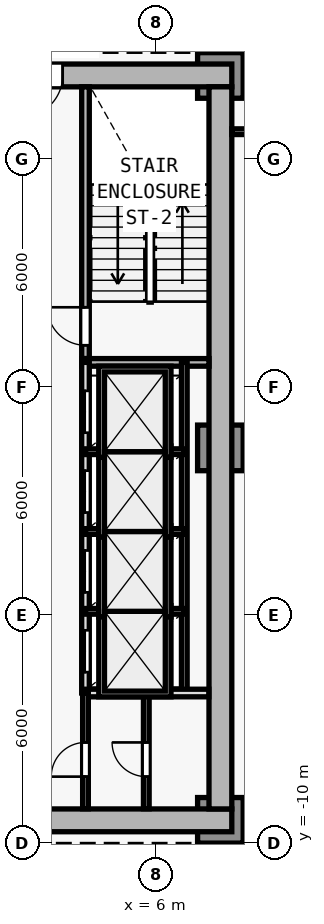
"""IFC4 building model, lengths in metres.
Left out: names, types, materials, properties, quantities, classifications, styles, units other than length and angle.
Written with IfcOpenShell. Run it as: python <this file> out.ifc"""

import sys

from ifc_helpers import new_model, si_unit, direction, frame, frame_2d, origin, origin_2d, place, context, subcontext, project, spatial, rectangle, extrude, element, fill, save


model = new_model("IFC4")
c1 = context("Model", 3, precision=1e-05, world=origin(), true_north=direction((0.0, 1.0)))
c2 = subcontext(c1, "Body", "Model", "MODEL_VIEW")
j1 = project(units=[si_unit("LENGTHUNIT", "METRE"), si_unit("PLANEANGLEUNIT", "RADIAN")], contexts=[c1])
p1 = place(None, origin())
s1 = spatial("IfcSite", under=j1, at=p1, CompositionType="ELEMENT")
p2 = place(p1, origin())
s2 = spatial("IfcBuilding", under=s1, at=p2, CompositionType="ELEMENT")
p3 = place(p2, frame((0.0, 0.0, 5.0)))
s3 = spatial("IfcBuildingStorey", under=s2, at=p3, CompositionType="ELEMENT", Elevation=5.0)
for number, where, z_axis, x_axis in (
    (1, (7.7, -9.4, 0.0), (0.0, 0.0, 1.0), (1.0, 0.0, 0.0)),
    (2, (7.7, 10.2, 0.0), (0.0, 0.0, 1.0), (1.0, 0.0, 0.0)),
    (3, (7.7, 0.4, 0.0), (0.0, 0.0, 1.0), (1.0, 0.0, 0.0)),
):
    element("IfcColumn", number, at=place(p3, frame(where, z_axis=z_axis, x_axis=x_axis)), inside=s3, PredefinedType="COLUMN", context=c2, shape_type="SweptSolid", body=[
        extrude(rectangle(XDim=1.2, YDim=1.2, at=origin_2d()), origin(), (0.0, 0.0, 1.0), 4.2),
    ])
p4 = place(p3, frame((-8.0, -9.4, 0.0), z_axis=(0.0, 0.0, 1.0), x_axis=(1.0, 0.0, 0.0)))
e4 = element("IfcWall", 4, at=p4, inside=s3, PredefinedType="SHEAR", context=c2, shape_type="SweptSolid", body=[
    extrude(rectangle(XDim=16.0, YDim=0.6, at=frame_2d((8.0, 0.0))), origin(), (0.0, 0.0, 1.0), 3.92),
])
p5 = place(p4, frame((9.65, 0.0, 0.0)))
e5 = element("IfcOpeningElement", 5, at=p5, cuts=e4, PredefinedType="OPENING", context=c2, shape_type="SweptSolid", body=[
    extrude(rectangle(XDim=1.5, YDim=2.2, at=frame_2d((0.75, 1.1))), frame((0.0, 0.31, 0.0), z_axis=(0.0, -1.0, 0.0), x_axis=(1.0, 0.0, 0.0)), (0.0, 0.0, 1.0), 0.62),
])
p6 = place(p3, frame((8.0, 10.2, 0.0), z_axis=(0.0, 0.0, 1.0), x_axis=(-1.0, 0.0, 0.0)))
e6 = element("IfcWall", 6, at=p6, inside=s3, PredefinedType="SHEAR", context=c2, shape_type="SweptSolid", body=[
    extrude(rectangle(XDim=16.0, YDim=0.6, at=frame_2d((8.0, 0.0))), origin(), (0.0, 0.0, 1.0), 3.92),
])
p7 = place(p6, frame((4.45, 0.0, 0.0)))
e7 = element("IfcOpeningElement", 7, at=p7, cuts=e6, PredefinedType="OPENING", context=c2, shape_type="SweptSolid", body=[
    extrude(rectangle(XDim=1.1, YDim=2.15, at=frame_2d((0.55, 1.075))), frame((0.0, 0.31, 0.0), z_axis=(0.0, -1.0, 0.0), x_axis=(1.0, 0.0, 0.0)), (0.0, 0.0, 1.0), 0.62),
])
p8 = place(p3, frame((7.7, 9.9, 0.0), z_axis=(0.0, 0.0, 1.0), x_axis=(0.0, -1.0, 0.0)))
e8 = element("IfcWall", 8, at=p8, inside=s3, PredefinedType="SHEAR", context=c2, shape_type="SweptSolid", body=[
    extrude(rectangle(XDim=19.0, YDim=0.6, at=frame_2d((9.5, 0.0))), origin(), (0.0, 0.0, 1.0), 3.92),
])
p9 = place(p3, frame((4.15, 2.75, 0.0), z_axis=(0.0, 0.0, 1.0), x_axis=(0.0, 1.0, 0.0)))
e9 = element("IfcWall", 9, at=p9, inside=s3, PredefinedType="SOLIDWALL", context=c2, shape_type="SweptSolid", body=[
    extrude(rectangle(XDim=7.15, YDim=0.2, at=frame_2d((3.575, 0.0))), origin(), (0.0, 0.0, 1.0), 3.92),
])
p10 = place(p9, frame((0.35, 0.0, 0.0)))
e10 = element("IfcOpeningElement", 10, at=p10, cuts=e9, PredefinedType="OPENING", context=c2, shape_type="SweptSolid", body=[
    extrude(rectangle(XDim=1.0, YDim=2.15, at=frame_2d((0.5, 1.075))), frame((0.0, 0.11, 0.0), z_axis=(0.0, -1.0, 0.0), x_axis=(1.0, 0.0, 0.0)), (0.0, 0.0, 1.0), 0.22),
])
p11 = place(p3, frame((4.05, 2.65, 0.0), z_axis=(0.0, 0.0, 1.0), x_axis=(1.0, 0.0, 0.0)))
e11 = element("IfcWall", 11, at=p11, inside=s3, PredefinedType="SOLIDWALL", context=c2, shape_type="SweptSolid", body=[
    extrude(rectangle(XDim=3.35, YDim=0.2, at=frame_2d((1.675, 0.0))), origin(), (0.0, 0.0, 1.0), 3.92),
])
p12 = place(p3, frame((4.15, -6.05, 0.0), z_axis=(0.0, 0.0, 1.0), x_axis=(0.0, 1.0, 0.0)))
e12 = element("IfcWall", 12, at=p12, inside=s3, PredefinedType="SOLIDWALL", context=c2, shape_type="SweptSolid", body=[
    extrude(rectangle(XDim=8.7, YDim=0.2, at=frame_2d((4.35, 0.0))), origin(), (0.0, 0.0, 1.0), 3.92),
])
p13 = place(p12, frame((0.55, 0.0, 0.0)))
e13 = element("IfcOpeningElement", 13, at=p13, cuts=e12, PredefinedType="OPENING", context=c2, shape_type="SweptSolid", body=[
    extrude(rectangle(XDim=1.1, YDim=2.15, at=frame_2d((0.55, 1.075))), frame((0.0, 0.11, 0.0), z_axis=(0.0, -1.0, 0.0), x_axis=(1.0, 0.0, 0.0)), (0.0, 0.0, 1.0), 0.22),
])
p14 = place(p12, frame((2.65, 0.0, 0.0)))
e14 = element("IfcOpeningElement", 14, at=p14, cuts=e12, PredefinedType="OPENING", context=c2, shape_type="SweptSolid", body=[
    extrude(rectangle(XDim=1.1, YDim=2.15, at=frame_2d((0.55, 1.075))), frame((0.0, 0.11, 0.0), z_axis=(0.0, -1.0, 0.0), x_axis=(1.0, 0.0, 0.0)), (0.0, 0.0, 1.0), 0.22),
])
p15 = place(p12, frame((4.75, 0.0, 0.0)))
e15 = element("IfcOpeningElement", 15, at=p15, cuts=e12, PredefinedType="OPENING", context=c2, shape_type="SweptSolid", body=[
    extrude(rectangle(XDim=1.1, YDim=2.15, at=frame_2d((0.55, 1.075))), frame((0.0, 0.11, 0.0), z_axis=(0.0, -1.0, 0.0), x_axis=(1.0, 0.0, 0.0)), (0.0, 0.0, 1.0), 0.22),
])
p16 = place(p12, frame((6.85, 0.0, 0.0)))
e16 = element("IfcOpeningElement", 16, at=p16, cuts=e12, PredefinedType="OPENING", context=c2, shape_type="SweptSolid", body=[
    extrude(rectangle(XDim=1.1, YDim=2.15, at=frame_2d((0.55, 1.075))), frame((0.0, 0.11, 0.0), z_axis=(0.0, -1.0, 0.0), x_axis=(1.0, 0.0, 0.0)), (0.0, 0.0, 1.0), 0.22),
])
p17 = place(p3, frame((6.75, -6.05, 0.0), z_axis=(0.0, 0.0, 1.0), x_axis=(0.0, 1.0, 0.0)))
e17 = element("IfcWall", 17, at=p17, inside=s3, PredefinedType="PARTITIONING", context=c2, shape_type="SweptSolid", body=[
    extrude(rectangle(XDim=8.7, YDim=0.15, at=frame_2d((4.35, 0.0))), origin(), (0.0, 0.0, 1.0), 3.92),
])
for number, where, z_axis, x_axis in (
    (18, (4.15, -3.9, 0.0), (0.0, 0.0, 1.0), (1.0, 0.0, 0.0)),
    (19, (4.15, -1.8, 0.0), (0.0, 0.0, 1.0), (1.0, 0.0, 0.0)),
    (20, (4.15, 0.3, 0.0), (0.0, 0.0, 1.0), (1.0, 0.0, 0.0)),
):
    element("IfcWall", number, at=place(p3, frame(where, z_axis=z_axis, x_axis=x_axis)), inside=s3, PredefinedType="PARTITIONING", context=c2, shape_type="SweptSolid", body=[
        extrude(rectangle(XDim=2.6, YDim=0.15, at=frame_2d((1.3, 0.0))), origin(), (0.0, 0.0, 1.0), 3.92),
    ])
p18 = place(p3, frame((4.15, -6.05, 0.0), z_axis=(0.0, 0.0, 1.0), x_axis=(1.0, 0.0, 0.0)))
e21 = element("IfcWall", 21, at=p18, inside=s3, PredefinedType="SOLIDWALL", context=c2, shape_type="SweptSolid", body=[
    extrude(rectangle(XDim=3.245, YDim=0.2, at=frame_2d((1.623, 0.0))), origin(), (0.0, 0.0, 1.0), 3.92),
])
p19 = place(p3, frame((4.15, -9.095, 0.0), z_axis=(0.0, 0.0, 1.0), x_axis=(0.0, 1.0, 0.0)))
e22 = element("IfcWall", 22, at=p19, inside=s3, PredefinedType="PARTITIONING", context=c2, shape_type="SweptSolid", body=[
    extrude(rectangle(XDim=3.045, YDim=0.15, at=frame_2d((1.522, 0.0))), origin(), (0.0, 0.0, 1.0), 3.92),
])
p20 = place(p19, frame((0.845, 0.0, 0.0)))
e23 = element("IfcOpeningElement", 23, at=p20, cuts=e22, PredefinedType="OPENING", context=c2, shape_type="SweptSolid", body=[
    extrude(rectangle(XDim=0.9, YDim=2.1, at=frame_2d((0.45, 1.05))), frame((0.0, 0.085, 0.0), z_axis=(0.0, -1.0, 0.0), x_axis=(1.0, 0.0, 0.0)), (0.0, 0.0, 1.0), 0.17),
])
p21 = place(p3, frame((5.75, -9.095, 0.0), z_axis=(0.0, 0.0, 1.0), x_axis=(0.0, 1.0, 0.0)))
e24 = element("IfcWall", 24, at=p21, inside=s3, PredefinedType="PARTITIONING", context=c2, shape_type="SweptSolid", body=[
    extrude(rectangle(XDim=3.045, YDim=0.15, at=frame_2d((1.522, 0.0))), origin(), (0.0, 0.0, 1.0), 3.92),
])
p22 = place(p21, frame((0.845, 0.0, 0.0)))
e25 = element("IfcOpeningElement", 25, at=p22, cuts=e24, PredefinedType="OPENING", context=c2, shape_type="SweptSolid", body=[
    extrude(rectangle(XDim=0.9, YDim=2.1, at=frame_2d((0.45, 1.05))), frame((0.0, 0.085, 0.0), z_axis=(0.0, -1.0, 0.0), x_axis=(1.0, 0.0, 0.0)), (0.0, 0.0, 1.0), 0.17),
])
p23 = place(p3, frame((8.0, 8.72, 0.0), z_axis=(0.0, 0.0, 1.0), x_axis=(1.0, 0.0, 0.0)))
e26 = element("IfcWall", 26, at=p23, inside=s3, PredefinedType="PARTITIONING", context=c2, shape_type="SweptSolid", body=[
    extrude(rectangle(XDim=12.4, YDim=0.15, at=frame_2d((6.2, 0.0))), origin(), (0.0, 0.0, 1.0), 3.92),
])
p24 = place(p7, origin())
e27 = element("IfcDoor", 27, at=p24, inside=s3, OperationType="SINGLE_SWING_RIGHT", PredefinedType="DOOR", context=c2, shape_type="SweptSolid", body=[
    extrude(rectangle(XDim=1.1, YDim=2.15, at=frame_2d((0.55, 1.075))), frame((0.0, 0.025, 0.0), z_axis=(0.0, -1.0, 0.0), x_axis=(1.0, 0.0, 0.0)), (0.0, 0.0, 1.0), 0.05),
])
fill(e7, e27)
p25 = place(p10, origin())
e28 = element("IfcDoor", 28, at=p25, inside=s3, OperationType="SINGLE_SWING_RIGHT", PredefinedType="DOOR", context=c2, shape_type="SweptSolid", body=[
    extrude(rectangle(XDim=1.0, YDim=2.15, at=frame_2d((0.5, 1.075))), frame((0.0, 0.025, 0.0), z_axis=(0.0, -1.0, 0.0), x_axis=(1.0, 0.0, 0.0)), (0.0, 0.0, 1.0), 0.05),
])
fill(e10, e28)
p26 = place(p13, origin())
e29 = element("IfcDoor", 29, at=p26, inside=s3, OperationType="DOUBLE_DOOR_SLIDING", PredefinedType="DOOR", context=c2, shape_type="SweptSolid", body=[
    extrude(rectangle(XDim=1.1, YDim=2.15, at=frame_2d((0.55, 1.075))), frame((0.0, 0.025, 0.0), z_axis=(0.0, -1.0, 0.0), x_axis=(1.0, 0.0, 0.0)), (0.0, 0.0, 1.0), 0.05),
])
fill(e13, e29)
p27 = place(p14, origin())
e30 = element("IfcDoor", 30, at=p27, inside=s3, OperationType="DOUBLE_DOOR_SLIDING", PredefinedType="DOOR", context=c2, shape_type="SweptSolid", body=[
    extrude(rectangle(XDim=1.1, YDim=2.15, at=frame_2d((0.55, 1.075))), frame((0.0, 0.025, 0.0), z_axis=(0.0, -1.0, 0.0), x_axis=(1.0, 0.0, 0.0)), (0.0, 0.0, 1.0), 0.05),
])
fill(e14, e30)
p28 = place(p15, origin())
e31 = element("IfcDoor", 31, at=p28, inside=s3, OperationType="DOUBLE_DOOR_SLIDING", PredefinedType="DOOR", context=c2, shape_type="SweptSolid", body=[
    extrude(rectangle(XDim=1.1, YDim=2.15, at=frame_2d((0.55, 1.075))), frame((0.0, 0.025, 0.0), z_axis=(0.0, -1.0, 0.0), x_axis=(1.0, 0.0, 0.0)), (0.0, 0.0, 1.0), 0.05),
])
fill(e15, e31)
p29 = place(p16, origin())
e32 = element("IfcDoor", 32, at=p29, inside=s3, OperationType="DOUBLE_DOOR_SLIDING", PredefinedType="DOOR", context=c2, shape_type="SweptSolid", body=[
    extrude(rectangle(XDim=1.1, YDim=2.15, at=frame_2d((0.55, 1.075))), frame((0.0, 0.025, 0.0), z_axis=(0.0, -1.0, 0.0), x_axis=(1.0, 0.0, 0.0)), (0.0, 0.0, 1.0), 0.05),
])
fill(e16, e32)
p30 = place(p20, origin())
e33 = element("IfcDoor", 33, at=p30, inside=s3, OperationType="SINGLE_SWING_LEFT", PredefinedType="DOOR", context=c2, shape_type="SweptSolid", body=[
    extrude(rectangle(XDim=0.9, YDim=2.1, at=frame_2d((0.45, 1.05))), frame((0.0, 0.025, 0.0), z_axis=(0.0, -1.0, 0.0), x_axis=(1.0, 0.0, 0.0)), (0.0, 0.0, 1.0), 0.05),
])
fill(e23, e33)
p31 = place(p22, origin())
e34 = element("IfcDoor", 34, at=p31, inside=s3, OperationType="SINGLE_SWING_RIGHT", PredefinedType="DOOR", context=c2, shape_type="SweptSolid", body=[
    extrude(rectangle(XDim=0.9, YDim=2.1, at=frame_2d((0.45, 1.05))), frame((0.0, 0.025, 0.0), z_axis=(0.0, -1.0, 0.0), x_axis=(1.0, 0.0, 0.0)), (0.0, 0.0, 1.0), 0.05),
])
fill(e25, e34)
save(model, sys.argv[1])
